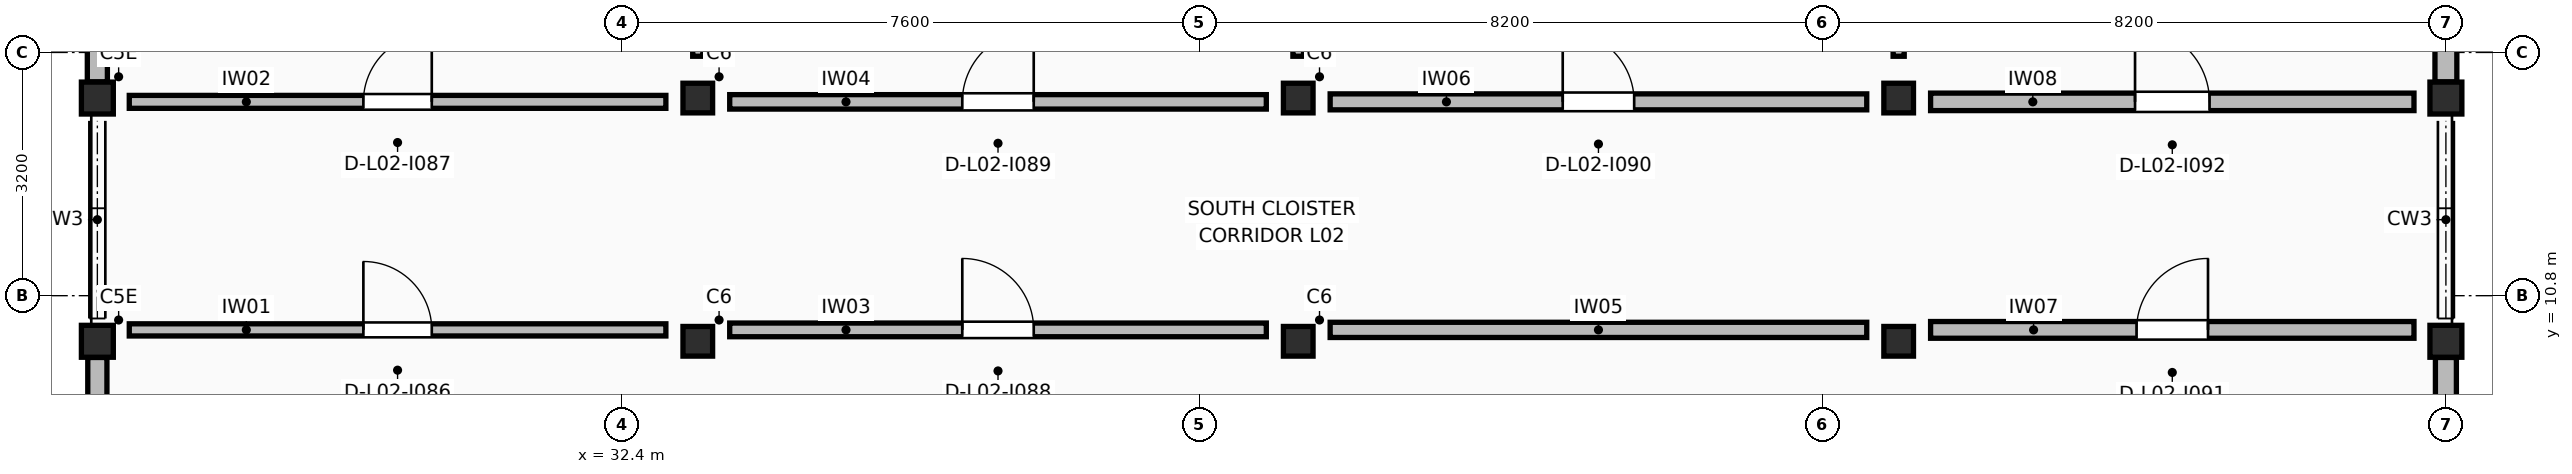
"""IFC4 building model, lengths in metres.
Left out: names, types, materials, properties, quantities, classifications, styles, units other than length and angle.
Written with IfcOpenShell. Run it as: python <this file> out.ifc"""

import sys

from ifc_helpers import new_model, si_unit, direction, frame, frame_2d, origin, origin_2d, place, context, subcontext, project, spatial, rectangle, extrude, element, fill, save


model = new_model("IFC4")
c1 = context("Model", 3, precision=1e-05, world=origin(), true_north=direction((0.0, 1.0)))
c2 = subcontext(c1, "Body", "Model", "MODEL_VIEW")
j1 = project(units=[si_unit("LENGTHUNIT", "METRE"), si_unit("PLANEANGLEUNIT", "RADIAN")], contexts=[c1])
p1 = place(None, origin())
s1 = spatial("IfcSite", under=j1, at=p1, CompositionType="ELEMENT")
p2 = place(p1, origin())
s2 = spatial("IfcBuilding", under=s1, at=p2, CompositionType="ELEMENT")
p3 = place(p2, frame((0.0, 0.0, 8.16)))
s3 = spatial("IfcBuildingStorey", under=s2, at=p3, CompositionType="ELEMENT", Elevation=8.16)
for number, where, z_axis, x_axis in (
    (1, (25.5, 10.2, 0.0), (0.0, 0.0, 1.0), (1.0, 0.0, 0.0)),
    (2, (25.5, 13.4, 0.0), (0.0, 0.0, 1.0), (1.0, 0.0, 0.0)),
):
    element("IfcColumn", number, at=place(p3, frame(where, z_axis=z_axis, x_axis=x_axis)), inside=s3, PredefinedType="COLUMN", context=c2, shape_type="SweptSolid", body=[
        extrude(rectangle(XDim=0.42, YDim=0.42, at=origin_2d()), origin(), (0.0, 0.0, 1.0), 3.74),
    ])
for number, where, z_axis, x_axis in (
    (3, (33.4, 10.2, 0.0), (0.0, 0.0, 1.0), (1.0, 0.0, 0.0)),
    (4, (33.4, 13.4, 0.0), (0.0, 0.0, 1.0), (1.0, 0.0, 0.0)),
    (5, (41.3, 10.2, 0.0), (0.0, 0.0, 1.0), (1.0, 0.0, 0.0)),
    (6, (41.3, 13.4, 0.0), (0.0, 0.0, 1.0), (1.0, 0.0, 0.0)),
    (7, (49.2, 10.2, 0.0), (0.0, 0.0, 1.0), (1.0, 0.0, 0.0)),
    (8, (49.2, 13.4, 0.0), (0.0, 0.0, 1.0), (1.0, 0.0, 0.0)),
):
    element("IfcColumn", number, at=place(p3, frame(where, z_axis=z_axis, x_axis=x_axis)), inside=s3, PredefinedType="COLUMN", context=c2, shape_type="SweptSolid", body=[
        extrude(rectangle(XDim=0.39, YDim=0.39, at=origin_2d()), origin(), (0.0, 0.0, 1.0), 3.74),
    ])
for number, where, z_axis, x_axis in (
    (9, (56.4, 10.2, 0.0), (0.0, 0.0, 1.0), (1.0, 0.0, 0.0)),
    (10, (56.4, 13.4, 0.0), (0.0, 0.0, 1.0), (1.0, 0.0, 0.0)),
):
    element("IfcColumn", number, at=place(p3, frame(where, z_axis=z_axis, x_axis=x_axis)), inside=s3, PredefinedType="COLUMN", context=c2, shape_type="SweptSolid", body=[
        extrude(rectangle(XDim=0.42, YDim=0.42, at=origin_2d()), origin(), (0.0, 0.0, 1.0), 3.74),
    ])
p4 = place(p3, frame((25.5, 4.413, 0.0), z_axis=(0.0, 0.0, 1.0), x_axis=(0.0, 1.0, 0.0)))
e11 = element("IfcWall", 11, at=p4, inside=s3, PredefinedType="STANDARD", context=c2, shape_type="SweptSolid", body=[
    extrude(rectangle(XDim=5.574, YDim=0.252, at=frame_2d((2.787, 0.0))), origin(), (0.0, 0.0, 1.0), 2.78),
])
p5 = place(p4, frame((2.117, 0.0, 0.95)))
e12 = element("IfcOpeningElement", 12, at=p5, cuts=e11, PredefinedType="OPENING", context=c2, shape_type="SweptSolid", body=[
    extrude(rectangle(XDim=1.34, YDim=1.3, at=frame_2d((0.67, 0.65))), frame((0.0, 0.136, 0.0), z_axis=(0.0, -1.0, 0.0), x_axis=(1.0, 0.0, 0.0)), (0.0, 0.0, 1.0), 0.272),
])
p6 = place(p3, frame((25.5, 13.613, 0.0), z_axis=(0.0, 0.0, 1.0), x_axis=(0.0, 1.0, 0.0)))
e13 = element("IfcWall", 13, at=p6, inside=s3, PredefinedType="STANDARD", context=c2, shape_type="SweptSolid", body=[
    extrude(rectangle(XDim=7.174, YDim=0.264, at=frame_2d((3.587, 0.0))), origin(), (0.0, 0.0, 1.0), 2.78),
])
p7 = place(p6, frame((2.917, 0.0, 0.95)))
e14 = element("IfcOpeningElement", 14, at=p7, cuts=e13, PredefinedType="OPENING", context=c2, shape_type="SweptSolid", body=[
    extrude(rectangle(XDim=1.34, YDim=1.45, at=frame_2d((0.67, 0.725))), frame((0.0, 0.142, 0.0), z_axis=(0.0, -1.0, 0.0), x_axis=(1.0, 0.0, 0.0)), (0.0, 0.0, 1.0), 0.284),
])
p8 = place(p3, frame((56.4, 4.413, 0.0), z_axis=(0.0, 0.0, 1.0), x_axis=(0.0, 1.0, 0.0)))
e15 = element("IfcWall", 15, at=p8, inside=s3, PredefinedType="STANDARD", context=c2, shape_type="SweptSolid", body=[
    extrude(rectangle(XDim=5.574, YDim=0.276, at=frame_2d((2.787, 0.0))), origin(), (0.0, 0.0, 1.0), 2.78),
])
p9 = place(p8, frame((2.117, 0.0, 0.95)))
e16 = element("IfcOpeningElement", 16, at=p9, cuts=e15, PredefinedType="OPENING", context=c2, shape_type="SweptSolid", body=[
    extrude(rectangle(XDim=1.34, YDim=1.6, at=frame_2d((0.67, 0.8))), frame((0.0, 0.148, 0.0), z_axis=(0.0, -1.0, 0.0), x_axis=(1.0, 0.0, 0.0)), (0.0, 0.0, 1.0), 0.296),
])
p10 = place(p3, frame((56.4, 13.613, 0.0), z_axis=(0.0, 0.0, 1.0), x_axis=(0.0, 1.0, 0.0)))
e17 = element("IfcWall", 17, at=p10, inside=s3, PredefinedType="STANDARD", context=c2, shape_type="SweptSolid", body=[
    extrude(rectangle(XDim=7.174, YDim=0.288, at=frame_2d((3.587, 0.0))), origin(), (0.0, 0.0, 1.0), 2.78),
])
p11 = place(p10, frame((2.857, 0.0, 0.95)))
e18 = element("IfcOpeningElement", 18, at=p11, cuts=e17, PredefinedType="OPENING", context=c2, shape_type="SweptSolid", body=[
    extrude(rectangle(XDim=1.46, YDim=1.15, at=frame_2d((0.73, 0.575))), frame((0.0, 0.154, 0.0), z_axis=(0.0, -1.0, 0.0), x_axis=(1.0, 0.0, 0.0)), (0.0, 0.0, 1.0), 0.308),
])
p12 = place(p3, frame((25.92, 10.35, 0.0), z_axis=(0.0, 0.0, 1.0), x_axis=(1.0, 0.0, 0.0)))
e19 = element("IfcWall", 19, at=p12, inside=s3, PredefinedType="STANDARD", context=c2, shape_type="SweptSolid", body=[
    extrude(rectangle(XDim=7.06, YDim=0.16, at=frame_2d((3.53, 0.0))), origin(), (0.0, 0.0, 1.0), 2.75),
])
p13 = place(p12, frame((3.08, 0.0, 0.0)))
e20 = element("IfcOpeningElement", 20, at=p13, cuts=e19, PredefinedType="OPENING", context=c2, shape_type="SweptSolid", body=[
    extrude(rectangle(XDim=0.9, YDim=2.18, at=frame_2d((0.45, 1.09))), frame((0.0, 0.09, 0.0), z_axis=(0.0, -1.0, 0.0), x_axis=(1.0, 0.0, 0.0)), (0.0, 0.0, 1.0), 0.18),
])
p14 = place(p3, frame((25.92, 13.35, 0.0), z_axis=(0.0, 0.0, 1.0), x_axis=(1.0, 0.0, 0.0)))
e21 = element("IfcWall", 21, at=p14, inside=s3, PredefinedType="STANDARD", context=c2, shape_type="SweptSolid", body=[
    extrude(rectangle(XDim=7.06, YDim=0.17, at=frame_2d((3.53, 0.0))), origin(), (0.0, 0.0, 1.0), 2.75),
])
p15 = place(p14, frame((3.08, 0.0, 0.0)))
e22 = element("IfcOpeningElement", 22, at=p15, cuts=e21, PredefinedType="OPENING", context=c2, shape_type="SweptSolid", body=[
    extrude(rectangle(XDim=0.9, YDim=2.24, at=frame_2d((0.45, 1.12))), frame((0.0, 0.095, 0.0), z_axis=(0.0, -1.0, 0.0), x_axis=(1.0, 0.0, 0.0)), (0.0, 0.0, 1.0), 0.19),
])
p16 = place(p3, frame((33.82, 10.35, 0.0), z_axis=(0.0, 0.0, 1.0), x_axis=(1.0, 0.0, 0.0)))
e23 = element("IfcWall", 23, at=p16, inside=s3, PredefinedType="STANDARD", context=c2, shape_type="SweptSolid", body=[
    extrude(rectangle(XDim=7.06, YDim=0.18, at=frame_2d((3.53, 0.0))), origin(), (0.0, 0.0, 1.0), 2.75),
])
p17 = place(p16, frame((3.06, 0.0, 0.0)))
e24 = element("IfcOpeningElement", 24, at=p17, cuts=e23, PredefinedType="OPENING", context=c2, shape_type="SweptSolid", body=[
    extrude(rectangle(XDim=0.94, YDim=2.06, at=frame_2d((0.47, 1.03))), frame((0.0, 0.1, 0.0), z_axis=(0.0, -1.0, 0.0), x_axis=(1.0, 0.0, 0.0)), (0.0, 0.0, 1.0), 0.2),
])
p18 = place(p3, frame((33.82, 13.35, 0.0), z_axis=(0.0, 0.0, 1.0), x_axis=(1.0, 0.0, 0.0)))
e25 = element("IfcWall", 25, at=p18, inside=s3, PredefinedType="STANDARD", context=c2, shape_type="SweptSolid", body=[
    extrude(rectangle(XDim=7.06, YDim=0.19, at=frame_2d((3.53, 0.0))), origin(), (0.0, 0.0, 1.0), 2.75),
])
p19 = place(p18, frame((3.06, 0.0, 0.0)))
e26 = element("IfcOpeningElement", 26, at=p19, cuts=e25, PredefinedType="OPENING", context=c2, shape_type="SweptSolid", body=[
    extrude(rectangle(XDim=0.94, YDim=2.12, at=frame_2d((0.47, 1.06))), frame((0.0, 0.105, 0.0), z_axis=(0.0, -1.0, 0.0), x_axis=(1.0, 0.0, 0.0)), (0.0, 0.0, 1.0), 0.21),
])
p20 = place(p3, frame((41.72, 10.35, 0.0), z_axis=(0.0, 0.0, 1.0), x_axis=(1.0, 0.0, 0.0)))
e27 = element("IfcWall", 27, at=p20, inside=s3, PredefinedType="STANDARD", context=c2, shape_type="SweptSolid", body=[
    extrude(rectangle(XDim=7.06, YDim=0.2, at=frame_2d((3.53, 0.0))), origin(), (0.0, 0.0, 1.0), 2.75),
])
p21 = place(p3, frame((41.72, 13.35, 0.0), z_axis=(0.0, 0.0, 1.0), x_axis=(1.0, 0.0, 0.0)))
e28 = element("IfcWall", 28, at=p21, inside=s3, PredefinedType="STANDARD", context=c2, shape_type="SweptSolid", body=[
    extrude(rectangle(XDim=7.06, YDim=0.21, at=frame_2d((3.53, 0.0))), origin(), (0.0, 0.0, 1.0), 2.75),
])
p22 = place(p21, frame((3.06, 0.0, 0.0)))
e29 = element("IfcOpeningElement", 29, at=p22, cuts=e28, PredefinedType="OPENING", context=c2, shape_type="SweptSolid", body=[
    extrude(rectangle(XDim=0.94, YDim=2.18, at=frame_2d((0.47, 1.09))), frame((0.0, 0.115, 0.0), z_axis=(0.0, -1.0, 0.0), x_axis=(1.0, 0.0, 0.0)), (0.0, 0.0, 1.0), 0.23),
])
p23 = place(p3, frame((49.62, 10.35, 0.0), z_axis=(0.0, 0.0, 1.0), x_axis=(1.0, 0.0, 0.0)))
e30 = element("IfcWall", 30, at=p23, inside=s3, PredefinedType="STANDARD", context=c2, shape_type="SweptSolid", body=[
    extrude(rectangle(XDim=6.36, YDim=0.22, at=frame_2d((3.18, 0.0))), origin(), (0.0, 0.0, 1.0), 2.75),
])
p24 = place(p23, frame((2.71, 0.0, 0.0)))
e31 = element("IfcOpeningElement", 31, at=p24, cuts=e30, PredefinedType="OPENING", context=c2, shape_type="SweptSolid", body=[
    extrude(rectangle(XDim=0.94, YDim=2.24, at=frame_2d((0.47, 1.12))), frame((0.0, 0.12, 0.0), z_axis=(0.0, -1.0, 0.0), x_axis=(1.0, 0.0, 0.0)), (0.0, 0.0, 1.0), 0.24),
])
p25 = place(p3, frame((49.62, 13.35, 0.0), z_axis=(0.0, 0.0, 1.0), x_axis=(1.0, 0.0, 0.0)))
e32 = element("IfcWall", 32, at=p25, inside=s3, PredefinedType="STANDARD", context=c2, shape_type="SweptSolid", body=[
    extrude(rectangle(XDim=6.36, YDim=0.23, at=frame_2d((3.18, 0.0))), origin(), (0.0, 0.0, 1.0), 2.75),
])
p26 = place(p25, frame((2.69, 0.0, 0.0)))
e33 = element("IfcOpeningElement", 33, at=p26, cuts=e32, PredefinedType="OPENING", context=c2, shape_type="SweptSolid", body=[
    extrude(rectangle(XDim=0.98, YDim=2.06, at=frame_2d((0.49, 1.03))), frame((0.0, 0.125, 0.0), z_axis=(0.0, -1.0, 0.0), x_axis=(1.0, 0.0, 0.0)), (0.0, 0.0, 1.0), 0.25),
])
p27 = place(p3, frame((33.4, 13.95, 0.0), z_axis=(0.0, 0.0, 1.0), x_axis=(0.0, 1.0, 0.0)))
e34 = element("IfcWall", 34, at=p27, inside=s3, PredefinedType="PARTITIONING", context=c2, shape_type="SweptSolid", body=[
    extrude(rectangle(XDim=6.2, YDim=0.134, at=frame_2d((3.1, 0.0))), origin(), (0.0, 0.0, 1.0), 2.75),
])
p28 = place(p3, frame((41.3, 13.95, 0.0), z_axis=(0.0, 0.0, 1.0), x_axis=(0.0, 1.0, 0.0)))
e35 = element("IfcWall", 35, at=p28, inside=s3, PredefinedType="PARTITIONING", context=c2, shape_type="SweptSolid", body=[
    extrude(rectangle(XDim=6.2, YDim=0.14, at=frame_2d((3.1, 0.0))), origin(), (0.0, 0.0, 1.0), 2.75),
])
p29 = place(p3, frame((49.2, 13.95, 0.0), z_axis=(0.0, 0.0, 1.0), x_axis=(0.0, 1.0, 0.0)))
e36 = element("IfcWall", 36, at=p29, inside=s3, PredefinedType="PARTITIONING", context=c2, shape_type="SweptSolid", body=[
    extrude(rectangle(XDim=6.2, YDim=0.146, at=frame_2d((3.1, 0.0))), origin(), (0.0, 0.0, 1.0), 2.75),
])
p30 = place(p13, origin())
e37 = element("IfcDoor", 37, at=p30, inside=s3, OperationType="SINGLE_SWING_LEFT", PredefinedType="DOOR", context=c2, shape_type="SweptSolid", body=[
    extrude(rectangle(XDim=0.9, YDim=2.18, at=frame_2d((0.45, 1.09))), frame((0.0, 0.025, 0.0), z_axis=(0.0, -1.0, 0.0), x_axis=(1.0, 0.0, 0.0)), (0.0, 0.0, 1.0), 0.05),
])
fill(e20, e37)
p31 = place(p15, frame((0.9, 0.0, 0.0), z_axis=(0.0, 0.0, 1.0), x_axis=(-1.0, 0.0, 0.0)))
e38 = element("IfcDoor", 38, at=p31, inside=s3, OperationType="SINGLE_SWING_RIGHT", PredefinedType="DOOR", context=c2, shape_type="SweptSolid", body=[
    extrude(rectangle(XDim=0.9, YDim=2.24, at=frame_2d((0.45, 1.12))), frame((0.0, 0.025, 0.0), z_axis=(0.0, -1.0, 0.0), x_axis=(1.0, 0.0, 0.0)), (0.0, 0.0, 1.0), 0.05),
])
fill(e22, e38)
p32 = place(p17, origin())
e39 = element("IfcDoor", 39, at=p32, inside=s3, OperationType="SINGLE_SWING_LEFT", PredefinedType="DOOR", context=c2, shape_type="SweptSolid", body=[
    extrude(rectangle(XDim=0.94, YDim=2.06, at=frame_2d((0.47, 1.03))), frame((0.0, 0.025, 0.0), z_axis=(0.0, -1.0, 0.0), x_axis=(1.0, 0.0, 0.0)), (0.0, 0.0, 1.0), 0.05),
])
fill(e24, e39)
p33 = place(p19, frame((0.94, 0.0, 0.0), z_axis=(0.0, 0.0, 1.0), x_axis=(-1.0, 0.0, 0.0)))
e40 = element("IfcDoor", 40, at=p33, inside=s3, OperationType="SINGLE_SWING_RIGHT", PredefinedType="DOOR", context=c2, shape_type="SweptSolid", body=[
    extrude(rectangle(XDim=0.94, YDim=2.12, at=frame_2d((0.47, 1.06))), frame((0.0, 0.025, 0.0), z_axis=(0.0, -1.0, 0.0), x_axis=(1.0, 0.0, 0.0)), (0.0, 0.0, 1.0), 0.05),
])
fill(e26, e40)
p34 = place(p22, frame((0.94, 0.0, 0.0), z_axis=(0.0, 0.0, 1.0), x_axis=(-1.0, 0.0, 0.0)))
e41 = element("IfcDoor", 41, at=p34, inside=s3, OperationType="SINGLE_SWING_LEFT", PredefinedType="DOOR", context=c2, shape_type="SweptSolid", body=[
    extrude(rectangle(XDim=0.94, YDim=2.18, at=frame_2d((0.47, 1.09))), frame((0.0, 0.025, 0.0), z_axis=(0.0, -1.0, 0.0), x_axis=(1.0, 0.0, 0.0)), (0.0, 0.0, 1.0), 0.05),
])
fill(e29, e41)
p35 = place(p24, origin())
e42 = element("IfcDoor", 42, at=p35, inside=s3, OperationType="SINGLE_SWING_RIGHT", PredefinedType="DOOR", context=c2, shape_type="SweptSolid", body=[
    extrude(rectangle(XDim=0.94, YDim=2.24, at=frame_2d((0.47, 1.12))), frame((0.0, 0.025, 0.0), z_axis=(0.0, -1.0, 0.0), x_axis=(1.0, 0.0, 0.0)), (0.0, 0.0, 1.0), 0.05),
])
fill(e31, e42)
p36 = place(p26, frame((0.98, 0.0, 0.0), z_axis=(0.0, 0.0, 1.0), x_axis=(-1.0, 0.0, 0.0)))
e43 = element("IfcDoor", 43, at=p36, inside=s3, OperationType="SINGLE_SWING_LEFT", PredefinedType="DOOR", context=c2, shape_type="SweptSolid", body=[
    extrude(rectangle(XDim=0.98, YDim=2.06, at=frame_2d((0.49, 1.03))), frame((0.0, 0.025, 0.0), z_axis=(0.0, -1.0, 0.0), x_axis=(1.0, 0.0, 0.0)), (0.0, 0.0, 1.0), 0.05),
])
fill(e33, e43)
save(model, sys.argv[1])
